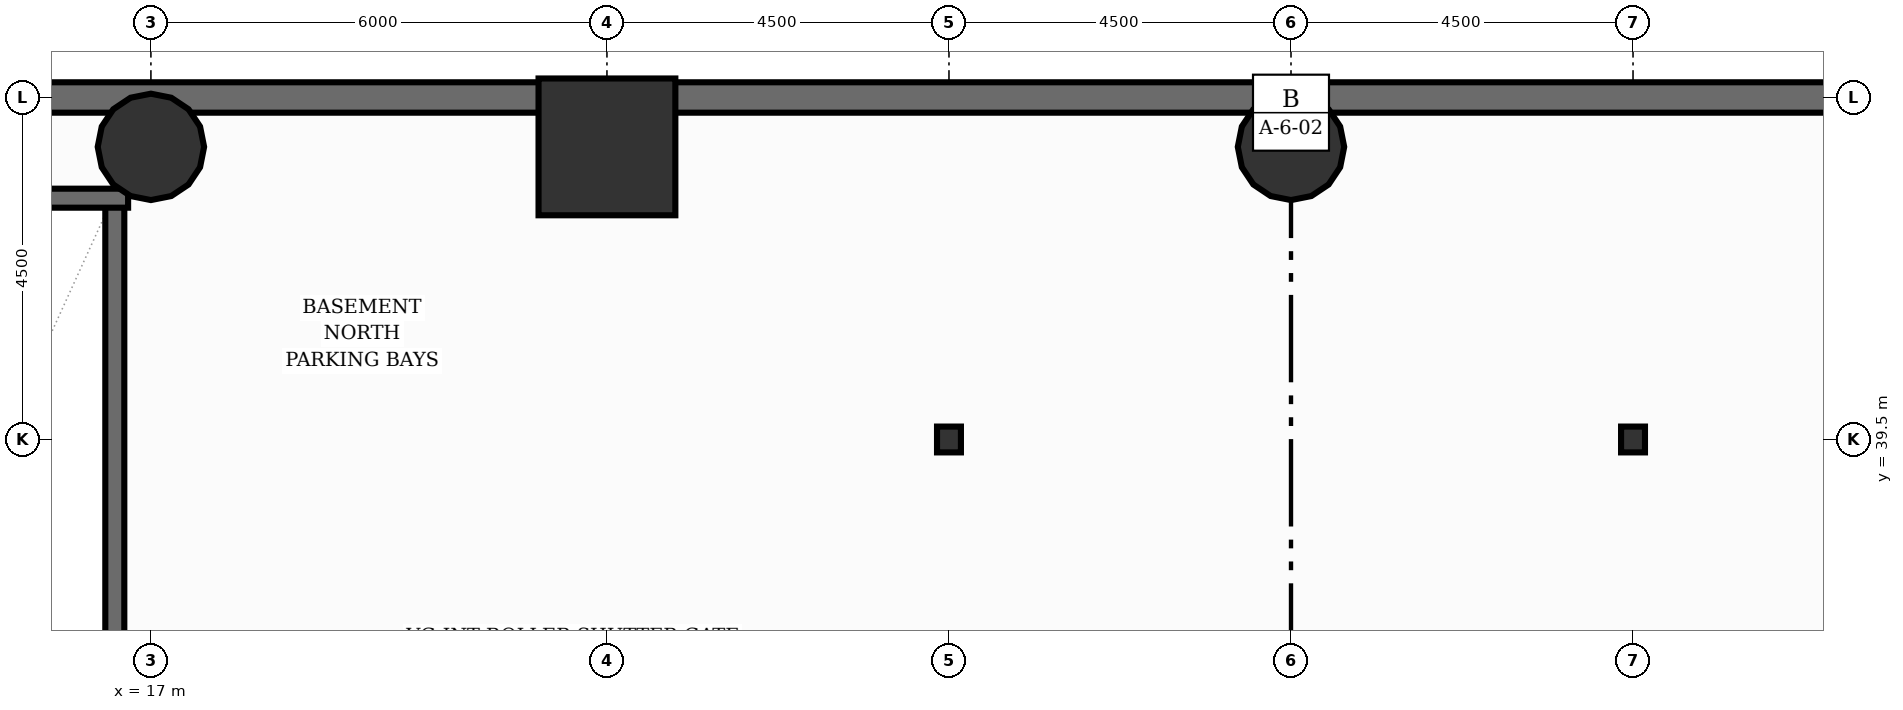
"""IFC4 building model, lengths in metres.
Left out: names, types, materials, properties, quantities, classifications, styles, units other than length and angle.
Written with IfcOpenShell. Run it as: python <this file> out.ifc"""

import sys

from ifc_helpers import new_model, si_unit, direction, frame, frame_2d, origin, origin_2d, place, context, subcontext, project, spatial, rectangle, circle, i_section, extrude, element, save


model = new_model("IFC4")
c1 = context("Model", 3, precision=1e-05, world=origin(), true_north=direction((0.0, 1.0)))
c2 = subcontext(c1, "Body", "Model", "MODEL_VIEW")
j1 = project(units=[si_unit("LENGTHUNIT", "METRE"), si_unit("PLANEANGLEUNIT", "RADIAN")], contexts=[c1])
p1 = place(None, origin())
s1 = spatial("IfcSite", under=j1, at=p1, CompositionType="ELEMENT")
p2 = place(p1, origin())
s2 = spatial("IfcBuilding", under=s1, at=p2, CompositionType="ELEMENT")
p3 = place(p2, frame((0.0, 0.0, -4.5)))
s3 = spatial("IfcBuildingStorey", under=s2, at=p3, CompositionType="ELEMENT", Elevation=-4.5)
p4 = place(p3, frame((16.525, 16.0, 0.0), z_axis=(0.0, 0.0, 1.0), x_axis=(0.0, 1.0, 0.0)))
e1 = element("IfcWall", 1, at=p4, inside=s3, PredefinedType="SHEAR", context=c2, shape_type="SweptSolid", body=[
    extrude(rectangle(XDim=26.7, YDim=0.25, at=frame_2d((13.35, 0.0))), origin(), (0.0, 0.0, 1.0), 4.5),
])
p5 = place(p3, frame((4.2, 42.675, 0.0), z_axis=(0.0, 0.0, 1.0), x_axis=(1.0, 0.0, 0.0)))
e2 = element("IfcWall", 2, at=p5, inside=s3, PredefinedType="SHEAR", context=c2, shape_type="SweptSolid", body=[
    extrude(rectangle(XDim=12.5, YDim=0.25, at=frame_2d((6.25, 0.0))), origin(), (0.0, 0.0, 1.0), 4.5),
])
p6 = place(p3, frame((3.8, 44.0, 0.0), z_axis=(0.0, 0.0, 1.0), x_axis=(1.0, 0.0, 0.0)))
e3 = element("IfcWall", 3, at=p6, inside=s3, PredefinedType="USERDEFINED", context=c2, shape_type="SweptSolid", body=[
    extrude(rectangle(XDim=56.4, YDim=0.4, at=frame_2d((28.2, 0.0))), origin(), (0.0, 0.0, 1.0), 4.5),
])
p7 = place(p3, frame((17.0, 43.35, 0.0), z_axis=(0.0, 0.0, 1.0), x_axis=(1.0, 0.0, 0.0)))
e4 = element("IfcColumn", 4, at=p7, inside=s3, PredefinedType="COLUMN", context=c2, shape_type="SweptSolid", body=[
    extrude(circle(Radius=0.7, at=origin_2d()), origin(), (0.0, 0.0, 1.0), 4.5),
])
p8 = place(p3, frame((23.0, 43.35, 0.0), z_axis=(0.0, 0.0, 1.0), x_axis=(1.0, 0.0, 0.0)))
e5 = element("IfcColumn", 5, at=p8, inside=s3, PredefinedType="COLUMN", context=c2, shape_type="SweptSolid", body=[
    extrude(rectangle(XDim=1.8, YDim=1.8, at=origin_2d()), origin(), (0.0, 0.0, 1.0), 4.5),
])
p9 = place(p3, frame((32.0, 43.35, 0.0), z_axis=(0.0, 0.0, 1.0), x_axis=(1.0, 0.0, 0.0)))
e6 = element("IfcColumn", 6, at=p9, inside=s3, PredefinedType="COLUMN", context=c2, shape_type="SweptSolid", body=[
    extrude(circle(Radius=0.7, at=origin_2d()), origin(), (0.0, 0.0, 1.0), 4.5),
])
for number, where, z_axis, x_axis in (
    (7, (27.5, 39.5, 0.0), (0.0, 0.0, 1.0), (1.0, 0.0, 0.0)),
    (8, (36.5, 39.5, 0.0), (0.0, 0.0, 1.0), (1.0, 0.0, 0.0)),
):
    element("IfcColumn", number, at=place(p3, frame(where, z_axis=z_axis, x_axis=x_axis)), inside=s3, PredefinedType="COLUMN", context=c2, shape_type="SweptSolid", body=[
        extrude(i_section(OverallWidth=0.314, OverallDepth=0.34, WebThickness=0.019, FlangeThickness=0.031, at=origin_2d()), origin(), (0.0, 0.0, 1.0), 4.5),
    ])
save(model, sys.argv[1])
